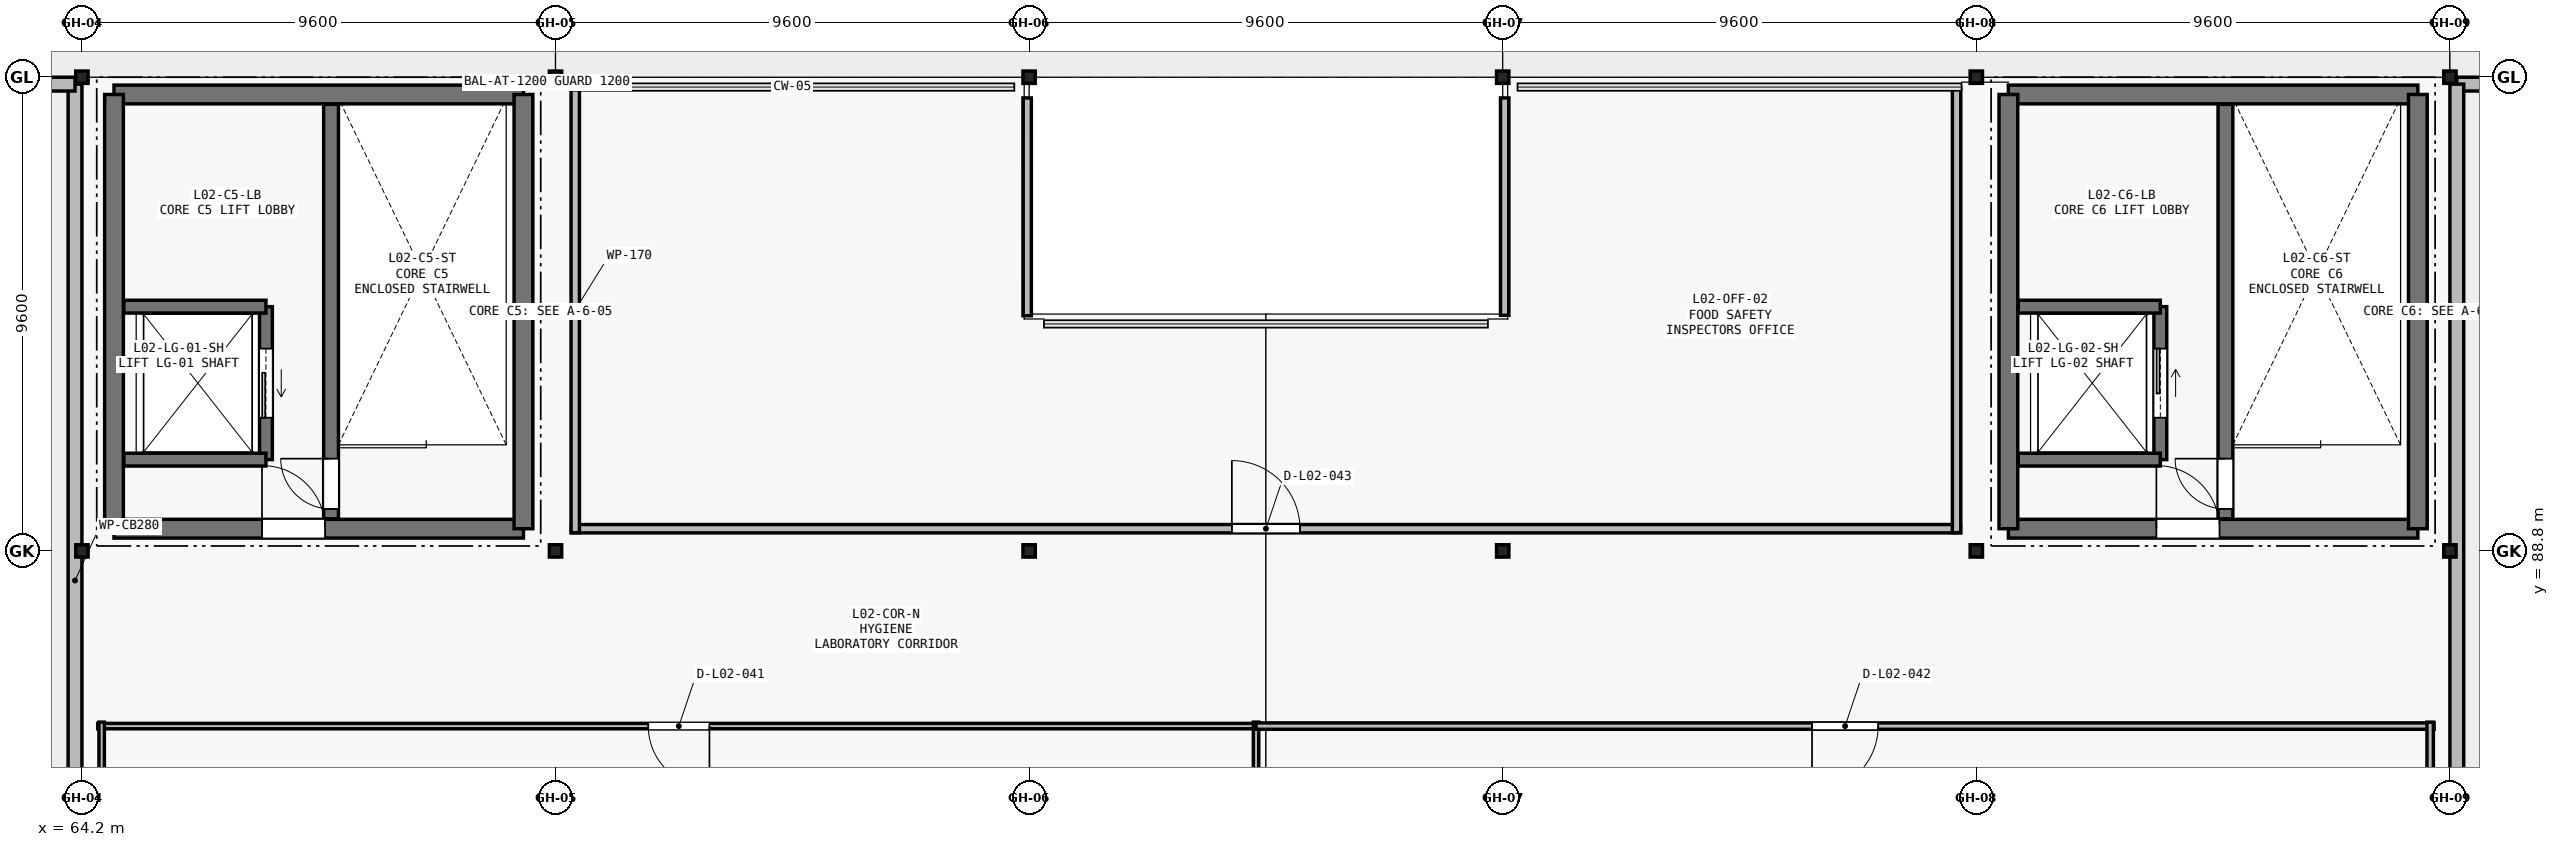
"""IFC4 building model, lengths in metres.
Left out: names, types, materials, properties, quantities, classifications, styles, units other than length and angle.
Written with IfcOpenShell. Run it as: python <this file> out.ifc"""

import sys

from ifc_helpers import new_model, si_unit, direction, frame, frame_2d, origin, origin_2d, place, context, subcontext, project, spatial, rectangle, i_section, extrude, element, fill, save


model = new_model("IFC4")
c1 = context("Model", 3, precision=1e-05, world=origin(), true_north=direction((0.0, 1.0)))
c2 = subcontext(c1, "Body", "Model", "MODEL_VIEW")
j1 = project(units=[si_unit("LENGTHUNIT", "METRE"), si_unit("PLANEANGLEUNIT", "RADIAN")], contexts=[c1])
p1 = place(None, origin())
s1 = spatial("IfcSite", under=j1, at=p1, CompositionType="ELEMENT")
p2 = place(p1, origin())
s2 = spatial("IfcBuilding", under=s1, at=p2, CompositionType="ELEMENT")
p3 = place(p2, frame((0.0, 0.0, 10.8)))
s3 = spatial("IfcBuildingStorey", under=s2, at=p3, CompositionType="ELEMENT", Elevation=10.8)
for number, where, z_axis, x_axis in (
    (1, (64.2, 88.8, 0.0), (0.0, 0.0, 1.0), (1.0, 0.0, 0.0)),
    (2, (64.2, 98.4, 0.0), (0.0, 0.0, 1.0), (1.0, 0.0, 0.0)),
    (3, (73.8, 88.8, 0.0), (0.0, 0.0, 1.0), (1.0, 0.0, 0.0)),
    (4, (73.8, 98.4, 0.0), (0.0, 0.0, 1.0), (1.0, 0.0, 0.0)),
    (5, (83.4, 88.8, 0.0), (0.0, 0.0, 1.0), (1.0, 0.0, 0.0)),
    (6, (83.4, 98.4, 0.0), (0.0, 0.0, 1.0), (1.0, 0.0, 0.0)),
    (7, (93.0, 88.8, 0.0), (0.0, 0.0, 1.0), (1.0, 0.0, 0.0)),
    (8, (93.0, 98.4, 0.0), (0.0, 0.0, 1.0), (1.0, 0.0, 0.0)),
    (9, (102.6, 88.8, 0.0), (0.0, 0.0, 1.0), (1.0, 0.0, 0.0)),
    (10, (102.6, 98.4, 0.0), (0.0, 0.0, 1.0), (1.0, 0.0, 0.0)),
    (11, (112.2, 88.8, 0.0), (0.0, 0.0, 1.0), (1.0, 0.0, 0.0)),
    (12, (112.2, 98.4, 0.0), (0.0, 0.0, 1.0), (1.0, 0.0, 0.0)),
):
    element("IfcColumn", number, at=place(p3, frame(where, z_axis=z_axis, x_axis=x_axis)), inside=s3, PredefinedType="COLUMN", context=c2, shape_type="SweptSolid", body=[
        extrude(i_section(OverallWidth=0.25, OverallDepth=0.25, WebThickness=0.009, FlangeThickness=0.014, FilletRadius=0.016, at=origin_2d()), origin(), (0.0, 0.0, 1.0), 4.2),
    ])
p4 = place(p3, frame((64.06, 78.14, 0.01), z_axis=(0.0, 0.0, 1.0), x_axis=(0.0, 1.0, 0.0)))
e13 = element("IfcWall", 13, at=p4, inside=s3, PredefinedType="PARAPET", context=c2, shape_type="SweptSolid", body=[
    extrude(rectangle(XDim=20.12, YDim=0.28, at=frame_2d((10.06, 0.0))), origin(), (0.0, 0.0, 1.0), 1.15),
])
p5 = place(p3, frame((64.06, 98.26, 0.01), z_axis=(0.0, 0.0, 1.0), x_axis=(-1.0, 0.0, 0.0)))
e14 = element("IfcWall", 14, at=p5, inside=s3, PredefinedType="PARAPET", context=c2, shape_type="SweptSolid", body=[
    extrude(rectangle(XDim=9.32, YDim=0.28, at=frame_2d((4.66, 0.0))), origin(), (0.0, 0.0, 1.0), 1.15),
])
p6 = place(p3, frame((121.66, 98.26, 0.01), z_axis=(0.0, 0.0, 1.0), x_axis=(-1.0, 0.0, 0.0)))
e15 = element("IfcWall", 15, at=p6, inside=s3, PredefinedType="PARAPET", context=c2, shape_type="SweptSolid", body=[
    extrude(rectangle(XDim=9.32, YDim=0.28, at=frame_2d((4.66, 0.0))), origin(), (0.0, 0.0, 1.0), 1.15),
])
p7 = place(p3, frame((112.34, 98.26, 0.01), z_axis=(0.0, 0.0, 1.0), x_axis=(0.0, -1.0, 0.0)))
e16 = element("IfcWall", 16, at=p7, inside=s3, PredefinedType="PARAPET", context=c2, shape_type="SweptSolid", body=[
    extrude(rectangle(XDim=20.12, YDim=0.28, at=frame_2d((10.06, 0.0))), origin(), (0.0, 0.0, 1.0), 1.15),
])
p8 = place(p3, frame((64.85, 89.25, 0.0), z_axis=(0.0, 0.0, 1.0), x_axis=(1.0, 0.0, 0.0)))
e17 = element("IfcWall", 17, at=p8, inside=s3, PredefinedType="SHEAR", context=c2, shape_type="SweptSolid", body=[
    extrude(rectangle(XDim=8.3, YDim=0.38, at=frame_2d((4.15, 0.0))), origin(), (0.0, 0.0, 1.0), 4.2),
])
p9 = place(p8, frame((3.0, 0.0, 0.0)))
e18 = element("IfcOpeningElement", 18, at=p9, cuts=e17, PredefinedType="OPENING", context=c2, shape_type="SweptSolid", body=[
    extrude(rectangle(XDim=1.28, YDim=2.15, at=frame_2d((0.64, 1.075))), frame((0.0, 0.2, 0.0), z_axis=(0.0, -1.0, 0.0), x_axis=(1.0, 0.0, 0.0)), (0.0, 0.0, 1.0), 0.4),
])
p10 = place(p3, frame((73.15, 98.05, 0.0), z_axis=(0.0, 0.0, 1.0), x_axis=(-1.0, 0.0, 0.0)))
e19 = element("IfcWall", 19, at=p10, inside=s3, PredefinedType="SHEAR", context=c2, shape_type="SweptSolid", body=[
    extrude(rectangle(XDim=8.3, YDim=0.38, at=frame_2d((4.15, 0.0))), origin(), (0.0, 0.0, 1.0), 4.2),
])
for number, where, z_axis, x_axis in (
    (20, (64.85, 98.05, 0.0), (0.0, 0.0, 1.0), (0.0, -1.0, 0.0)),
    (21, (73.15, 89.25, 0.0), (0.0, 0.0, 1.0), (0.0, 1.0, 0.0)),
):
    element("IfcWall", number, at=place(p3, frame(where, z_axis=z_axis, x_axis=x_axis)), inside=s3, PredefinedType="SHEAR", context=c2, shape_type="SweptSolid", body=[
        extrude(rectangle(XDim=8.8, YDim=0.38, at=frame_2d((4.4, 0.0))), origin(), (0.0, 0.0, 1.0), 4.2),
    ])
p11 = place(p3, frame((69.25, 89.45, 0.0), z_axis=(0.0, 0.0, 1.0), x_axis=(0.0, 1.0, 0.0)))
e22 = element("IfcWall", 22, at=p11, inside=s3, PredefinedType="SHEAR", context=c2, shape_type="SweptSolid", body=[
    extrude(rectangle(XDim=8.4, YDim=0.3, at=frame_2d((4.2, 0.0))), origin(), (0.0, 0.0, 1.0), 4.2),
])
p12 = place(p11, frame((0.2, 0.0, 0.0)))
e23 = element("IfcOpeningElement", 23, at=p12, cuts=e22, PredefinedType="OPENING", context=c2, shape_type="SweptSolid", body=[
    extrude(rectangle(XDim=1.02, YDim=2.1, at=frame_2d((0.51, 1.05))), frame((0.0, 0.16, 0.0), z_axis=(0.0, -1.0, 0.0), x_axis=(1.0, 0.0, 0.0)), (0.0, 0.0, 1.0), 0.32),
])
p13 = place(p3, frame((67.93, 90.65, 0.0), z_axis=(0.0, 0.0, 1.0), x_axis=(0.0, 1.0, 0.0)))
e24 = element("IfcWall", 24, at=p13, inside=s3, PredefinedType="SHEAR", context=c2, shape_type="SweptSolid", body=[
    extrude(rectangle(XDim=3.1, YDim=0.26, at=frame_2d((1.55, 0.0))), origin(), (0.0, 0.0, 1.0), 4.2),
])
p14 = place(p13, frame((0.85, 0.0, 0.0)))
e25 = element("IfcOpeningElement", 25, at=p14, cuts=e24, PredefinedType="OPENING", context=c2, shape_type="SweptSolid", body=[
    extrude(rectangle(XDim=1.4, YDim=2.25, at=frame_2d((0.7, 1.125))), frame((0.0, 0.14, 0.0), z_axis=(0.0, -1.0, 0.0), x_axis=(1.0, 0.0, 0.0)), (0.0, 0.0, 1.0), 0.28),
])
for number, where, z_axis, x_axis in (
    (26, (65.05, 90.65, 0.0), (0.0, 0.0, 1.0), (1.0, 0.0, 0.0)),
    (27, (65.05, 93.75, 0.0), (0.0, 0.0, 1.0), (1.0, 0.0, 0.0)),
):
    element("IfcWall", number, at=place(p3, frame(where, z_axis=z_axis, x_axis=x_axis)), inside=s3, PredefinedType="SHEAR", context=c2, shape_type="SweptSolid", body=[
        extrude(rectangle(XDim=2.88, YDim=0.26, at=frame_2d((1.44, 0.0))), origin(), (0.0, 0.0, 1.0), 4.2),
    ])
p15 = place(p3, frame((103.25, 89.25, 0.0), z_axis=(0.0, 0.0, 1.0), x_axis=(1.0, 0.0, 0.0)))
e28 = element("IfcWall", 28, at=p15, inside=s3, PredefinedType="SHEAR", context=c2, shape_type="SweptSolid", body=[
    extrude(rectangle(XDim=8.3, YDim=0.38, at=frame_2d((4.15, 0.0))), origin(), (0.0, 0.0, 1.0), 4.2),
])
p16 = place(p15, frame((3.0, 0.0, 0.0)))
e29 = element("IfcOpeningElement", 29, at=p16, cuts=e28, PredefinedType="OPENING", context=c2, shape_type="SweptSolid", body=[
    extrude(rectangle(XDim=1.28, YDim=2.15, at=frame_2d((0.64, 1.075))), frame((0.0, 0.2, 0.0), z_axis=(0.0, -1.0, 0.0), x_axis=(1.0, 0.0, 0.0)), (0.0, 0.0, 1.0), 0.4),
])
p17 = place(p3, frame((111.55, 98.05, 0.0), z_axis=(0.0, 0.0, 1.0), x_axis=(-1.0, 0.0, 0.0)))
e30 = element("IfcWall", 30, at=p17, inside=s3, PredefinedType="SHEAR", context=c2, shape_type="SweptSolid", body=[
    extrude(rectangle(XDim=8.3, YDim=0.38, at=frame_2d((4.15, 0.0))), origin(), (0.0, 0.0, 1.0), 4.2),
])
for number, where, z_axis, x_axis in (
    (31, (103.25, 98.05, 0.0), (0.0, 0.0, 1.0), (0.0, -1.0, 0.0)),
    (32, (111.55, 89.25, 0.0), (0.0, 0.0, 1.0), (0.0, 1.0, 0.0)),
):
    element("IfcWall", number, at=place(p3, frame(where, z_axis=z_axis, x_axis=x_axis)), inside=s3, PredefinedType="SHEAR", context=c2, shape_type="SweptSolid", body=[
        extrude(rectangle(XDim=8.8, YDim=0.38, at=frame_2d((4.4, 0.0))), origin(), (0.0, 0.0, 1.0), 4.2),
    ])
p18 = place(p3, frame((107.65, 89.45, 0.0), z_axis=(0.0, 0.0, 1.0), x_axis=(0.0, 1.0, 0.0)))
e33 = element("IfcWall", 33, at=p18, inside=s3, PredefinedType="SHEAR", context=c2, shape_type="SweptSolid", body=[
    extrude(rectangle(XDim=8.4, YDim=0.3, at=frame_2d((4.2, 0.0))), origin(), (0.0, 0.0, 1.0), 4.2),
])
p19 = place(p18, frame((0.2, 0.0, 0.0)))
e34 = element("IfcOpeningElement", 34, at=p19, cuts=e33, PredefinedType="OPENING", context=c2, shape_type="SweptSolid", body=[
    extrude(rectangle(XDim=1.02, YDim=2.1, at=frame_2d((0.51, 1.05))), frame((0.0, 0.16, 0.0), z_axis=(0.0, -1.0, 0.0), x_axis=(1.0, 0.0, 0.0)), (0.0, 0.0, 1.0), 0.32),
])
p20 = place(p3, frame((106.33, 90.65, 0.0), z_axis=(0.0, 0.0, 1.0), x_axis=(0.0, 1.0, 0.0)))
e35 = element("IfcWall", 35, at=p20, inside=s3, PredefinedType="SHEAR", context=c2, shape_type="SweptSolid", body=[
    extrude(rectangle(XDim=3.1, YDim=0.26, at=frame_2d((1.55, 0.0))), origin(), (0.0, 0.0, 1.0), 4.2),
])
p21 = place(p20, frame((0.85, 0.0, 0.0)))
e36 = element("IfcOpeningElement", 36, at=p21, cuts=e35, PredefinedType="OPENING", context=c2, shape_type="SweptSolid", body=[
    extrude(rectangle(XDim=1.4, YDim=2.25, at=frame_2d((0.7, 1.125))), frame((0.0, 0.14, 0.0), z_axis=(0.0, -1.0, 0.0), x_axis=(1.0, 0.0, 0.0)), (0.0, 0.0, 1.0), 0.28),
])
for number, where, z_axis, x_axis in (
    (37, (103.45, 90.65, 0.0), (0.0, 0.0, 1.0), (1.0, 0.0, 0.0)),
    (38, (103.45, 93.75, 0.0), (0.0, 0.0, 1.0), (1.0, 0.0, 0.0)),
):
    element("IfcWall", number, at=place(p3, frame(where, z_axis=z_axis, x_axis=x_axis)), inside=s3, PredefinedType="SHEAR", context=c2, shape_type="SweptSolid", body=[
        extrude(rectangle(XDim=2.88, YDim=0.26, at=frame_2d((1.44, 0.0))), origin(), (0.0, 0.0, 1.0), 4.2),
    ])
p22 = place(p3, frame((88.08, 85.25, 0.0), z_axis=(0.0, 0.0, 1.0), x_axis=(-1.0, 0.0, 0.0)))
e39 = element("IfcWall", 39, at=p22, inside=s3, PredefinedType="PARTITIONING", context=c2, shape_type="SweptSolid", body=[
    extrude(rectangle(XDim=23.56, YDim=0.11, at=frame_2d((11.78, 0.0))), origin(), (0.0, 0.0, 1.0), 3.72),
])
p23 = place(p22, frame((11.16, 0.0, 0.0)))
e40 = element("IfcOpeningElement", 40, at=p23, cuts=e39, PredefinedType="OPENING", context=c2, shape_type="SweptSolid", body=[
    extrude(rectangle(XDim=1.24, YDim=2.26, at=frame_2d((0.62, 1.13))), frame((0.0, 0.065, 0.0), z_axis=(0.0, -1.0, 0.0), x_axis=(1.0, 0.0, 0.0)), (0.0, 0.0, 1.0), 0.13),
])
for number, where, z_axis, x_axis in (
    (41, (88.0, 78.32, 0.0), (0.0, 0.0, 1.0), (0.0, 1.0, 0.0)),
    (42, (64.6, 85.33, 0.0), (0.0, 0.0, 1.0), (0.0, -1.0, 0.0)),
):
    element("IfcWall", number, at=place(p3, frame(where, z_axis=z_axis, x_axis=x_axis)), inside=s3, PredefinedType="PARTITIONING", context=c2, shape_type="SweptSolid", body=[
        extrude(rectangle(XDim=7.01, YDim=0.11, at=frame_2d((3.505, 0.0))), origin(), (0.0, 0.0, 1.0), 3.72),
    ])
p24 = place(p3, frame((111.88, 85.25, 0.0), z_axis=(0.0, 0.0, 1.0), x_axis=(-1.0, 0.0, 0.0)))
e43 = element("IfcWall", 43, at=p24, inside=s3, PredefinedType="PARTITIONING", context=c2, shape_type="SweptSolid", body=[
    extrude(rectangle(XDim=23.88, YDim=0.13, at=frame_2d((11.94, 0.0))), origin(), (0.0, 0.0, 1.0), 3.72),
])
p25 = place(p24, frame((11.27, 0.0, 0.0)))
e44 = element("IfcOpeningElement", 44, at=p25, cuts=e43, PredefinedType="OPENING", context=c2, shape_type="SweptSolid", body=[
    extrude(rectangle(XDim=1.34, YDim=2.26, at=frame_2d((0.67, 1.13))), frame((0.0, 0.075, 0.0), z_axis=(0.0, -1.0, 0.0), x_axis=(1.0, 0.0, 0.0)), (0.0, 0.0, 1.0), 0.15),
])
p26 = place(p3, frame((111.8, 78.32, 0.0), z_axis=(0.0, 0.0, 1.0), x_axis=(0.0, 1.0, 0.0)))
e45 = element("IfcWall", 45, at=p26, inside=s3, PredefinedType="PARTITIONING", context=c2, shape_type="SweptSolid", body=[
    extrude(rectangle(XDim=7.01, YDim=0.13, at=frame_2d((3.505, 0.0))), origin(), (0.0, 0.0, 1.0), 3.72),
])
p27 = place(p3, frame((74.12, 89.25, 0.0), z_axis=(0.0, 0.0, 1.0), x_axis=(1.0, 0.0, 0.0)))
e46 = element("IfcWall", 46, at=p27, inside=s3, PredefinedType="PARTITIONING", context=c2, shape_type="SweptSolid", body=[
    extrude(rectangle(XDim=28.16, YDim=0.17, at=frame_2d((14.08, 0.0))), origin(), (0.0, 0.0, 1.0), 3.72),
])
p28 = place(p27, frame((13.39, 0.0, 0.0)))
e47 = element("IfcOpeningElement", 47, at=p28, cuts=e46, PredefinedType="OPENING", context=c2, shape_type="SweptSolid", body=[
    extrude(rectangle(XDim=1.38, YDim=2.36, at=frame_2d((0.69, 1.18))), frame((0.0, 0.095, 0.0), z_axis=(0.0, -1.0, 0.0), x_axis=(1.0, 0.0, 0.0)), (0.0, 0.0, 1.0), 0.19),
])
for number, where, z_axis, x_axis in (
    (48, (74.2, 98.2, 0.0), (0.0, 0.0, 1.0), (0.0, -1.0, 0.0)),
    (49, (102.2, 89.17, 0.0), (0.0, 0.0, 1.0), (0.0, 1.0, 0.0)),
):
    element("IfcWall", number, at=place(p3, frame(where, z_axis=z_axis, x_axis=x_axis)), inside=s3, PredefinedType="PARTITIONING", context=c2, shape_type="SweptSolid", body=[
        extrude(rectangle(XDim=9.03, YDim=0.17, at=frame_2d((4.515, 0.0))), origin(), (0.0, 0.0, 1.0), 3.72),
    ])
p29 = place(p3, frame((83.361, 93.566, 0.0), z_axis=(0.0, 0.0, 1.0), x_axis=(-0.00011061335, 0.999999993882, 0.0)))
e50 = element("IfcWall", 50, at=p29, inside=s3, PredefinedType="PARTITIONING", context=c2, shape_type="SweptSolid", body=[
    extrude(rectangle(XDim=4.414, YDim=0.17, at=frame_2d((2.207, 0.0))), origin(), (0.0, 0.0, 1.0), 3.4),
])
p30 = place(p3, frame((93.04, 97.98, 0.0), z_axis=(0.0, 0.0, 1.0), x_axis=(0.0, -1.0, 0.0)))
e51 = element("IfcWall", 51, at=p30, inside=s3, PredefinedType="PARTITIONING", context=c2, shape_type="SweptSolid", body=[
    extrude(rectangle(XDim=4.405, YDim=0.17, at=frame_2d((2.203, 0.0))), origin(), (0.0, 0.0, 1.0), 3.4),
])
p31 = place(p9, origin())
e52 = element("IfcDoor", 52, at=p31, inside=s3, OperationType="SINGLE_SWING_LEFT", PredefinedType="DOOR", context=c2, shape_type="SweptSolid", body=[
    extrude(rectangle(XDim=1.28, YDim=2.15, at=frame_2d((0.64, 1.075))), frame((0.0, 0.025, 0.0), z_axis=(0.0, -1.0, 0.0), x_axis=(1.0, 0.0, 0.0)), (0.0, 0.0, 1.0), 0.05),
])
fill(e18, e52)
p32 = place(p12, origin())
e53 = element("IfcDoor", 53, at=p32, inside=s3, OperationType="SINGLE_SWING_RIGHT", PredefinedType="DOOR", context=c2, shape_type="SweptSolid", body=[
    extrude(rectangle(XDim=1.02, YDim=2.1, at=frame_2d((0.51, 1.05))), frame((0.0, 0.025, 0.0), z_axis=(0.0, -1.0, 0.0), x_axis=(1.0, 0.0, 0.0)), (0.0, 0.0, 1.0), 0.05),
])
fill(e23, e53)
p33 = place(p14, origin())
e54 = element("IfcDoor", 54, at=p33, inside=s3, OperationType="SLIDING_TO_LEFT", PredefinedType="DOOR", context=c2, shape_type="SweptSolid", body=[
    extrude(rectangle(XDim=1.4, YDim=2.25, at=frame_2d((0.7, 1.125))), frame((0.0, 0.025, 0.0), z_axis=(0.0, -1.0, 0.0), x_axis=(1.0, 0.0, 0.0)), (0.0, 0.0, 1.0), 0.05),
])
fill(e25, e54)
p34 = place(p16, origin())
e55 = element("IfcDoor", 55, at=p34, inside=s3, OperationType="SINGLE_SWING_LEFT", PredefinedType="DOOR", context=c2, shape_type="SweptSolid", body=[
    extrude(rectangle(XDim=1.28, YDim=2.15, at=frame_2d((0.64, 1.075))), frame((0.0, 0.025, 0.0), z_axis=(0.0, -1.0, 0.0), x_axis=(1.0, 0.0, 0.0)), (0.0, 0.0, 1.0), 0.05),
])
fill(e29, e55)
p35 = place(p19, origin())
e56 = element("IfcDoor", 56, at=p35, inside=s3, OperationType="SINGLE_SWING_RIGHT", PredefinedType="DOOR", context=c2, shape_type="SweptSolid", body=[
    extrude(rectangle(XDim=1.02, YDim=2.1, at=frame_2d((0.51, 1.05))), frame((0.0, 0.025, 0.0), z_axis=(0.0, -1.0, 0.0), x_axis=(1.0, 0.0, 0.0)), (0.0, 0.0, 1.0), 0.05),
])
fill(e34, e56)
p36 = place(p21, origin())
e57 = element("IfcDoor", 57, at=p36, inside=s3, OperationType="SLIDING_TO_RIGHT", PredefinedType="DOOR", context=c2, shape_type="SweptSolid", body=[
    extrude(rectangle(XDim=1.4, YDim=2.25, at=frame_2d((0.7, 1.125))), frame((0.0, 0.025, 0.0), z_axis=(0.0, -1.0, 0.0), x_axis=(1.0, 0.0, 0.0)), (0.0, 0.0, 1.0), 0.05),
])
fill(e36, e57)
p37 = place(p23, origin())
e58 = element("IfcDoor", 58, at=p37, inside=s3, OperationType="SINGLE_SWING_LEFT", PredefinedType="DOOR", context=c2, shape_type="SweptSolid", body=[
    extrude(rectangle(XDim=1.24, YDim=2.26, at=frame_2d((0.62, 1.13))), frame((0.0, 0.025, 0.0), z_axis=(0.0, -1.0, 0.0), x_axis=(1.0, 0.0, 0.0)), (0.0, 0.0, 1.0), 0.05),
])
fill(e40, e58)
p38 = place(p25, origin())
e59 = element("IfcDoor", 59, at=p38, inside=s3, OperationType="SINGLE_SWING_RIGHT", PredefinedType="DOOR", context=c2, shape_type="SweptSolid", body=[
    extrude(rectangle(XDim=1.34, YDim=2.26, at=frame_2d((0.67, 1.13))), frame((0.0, 0.025, 0.0), z_axis=(0.0, -1.0, 0.0), x_axis=(1.0, 0.0, 0.0)), (0.0, 0.0, 1.0), 0.05),
])
fill(e44, e59)
p39 = place(p28, origin())
e60 = element("IfcDoor", 60, at=p39, inside=s3, OperationType="SINGLE_SWING_LEFT", PredefinedType="DOOR", context=c2, shape_type="SweptSolid", body=[
    extrude(rectangle(XDim=1.38, YDim=2.36, at=frame_2d((0.69, 1.18))), frame((0.0, 0.025, 0.0), z_axis=(0.0, -1.0, 0.0), x_axis=(1.0, 0.0, 0.0)), (0.0, 0.0, 1.0), 0.05),
])
fill(e47, e60)
save(model, sys.argv[1])
